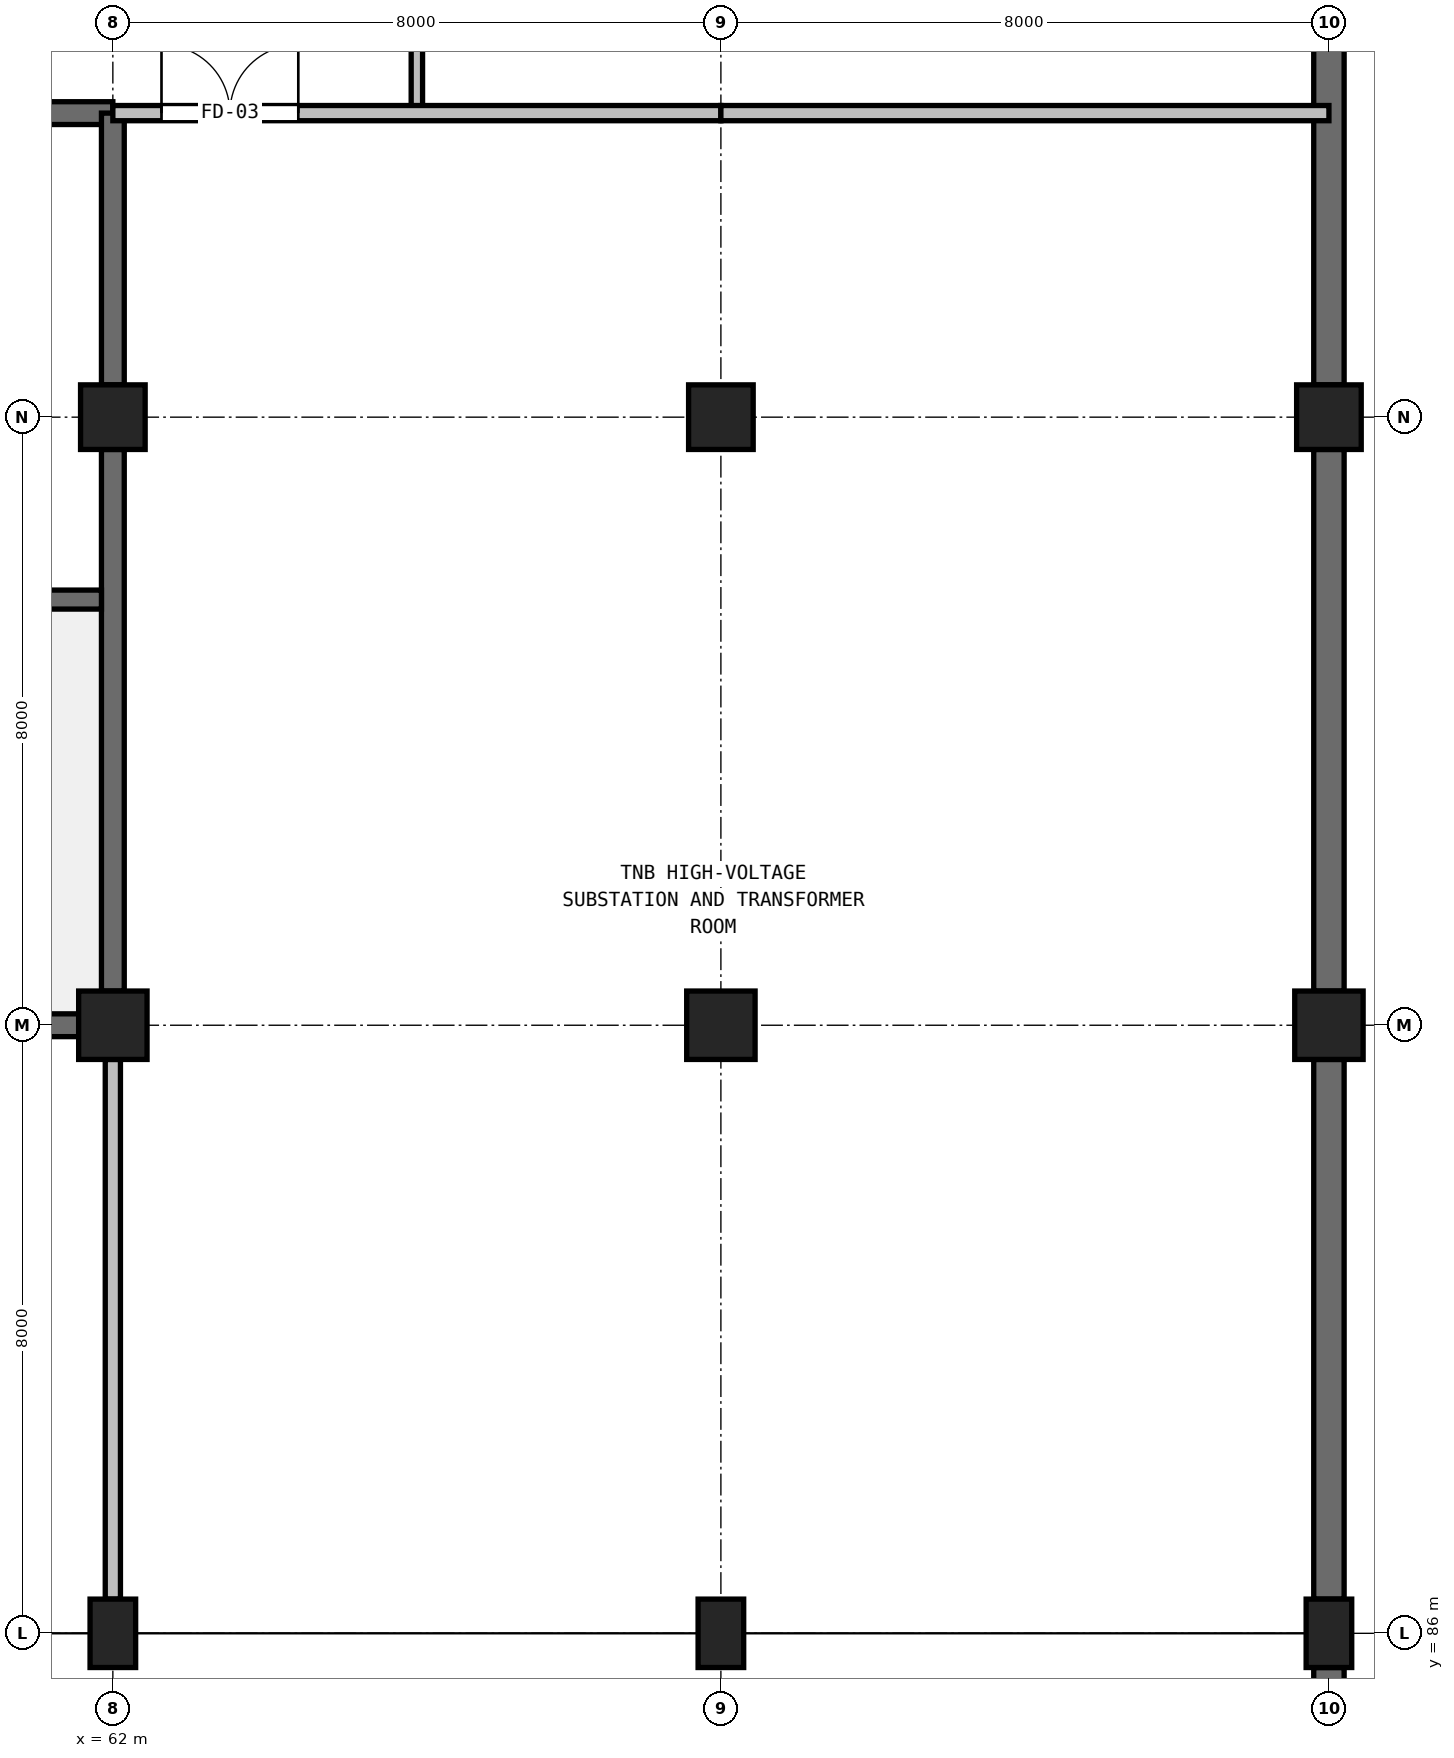
"""IFC4 building model, lengths in metres.
Left out: names, types, materials, properties, quantities, classifications, styles, units other than length and angle.
Written with IfcOpenShell. Run it as: python <this file> out.ifc"""

import sys

from ifc_helpers import new_model, si_unit, direction, frame, frame_2d, origin, origin_2d, place, context, subcontext, project, spatial, rectangle, extrude, element, fill, save


model = new_model("IFC4")
c1 = context("Model", 3, precision=1e-05, world=origin(), true_north=direction((0.0, 1.0)))
c2 = subcontext(c1, "Body", "Model", "MODEL_VIEW")
j1 = project(units=[si_unit("LENGTHUNIT", "METRE"), si_unit("PLANEANGLEUNIT", "RADIAN")], contexts=[c1])
p1 = place(None, origin())
s1 = spatial("IfcSite", under=j1, at=p1, CompositionType="ELEMENT")
p2 = place(p1, origin())
s2 = spatial("IfcBuilding", under=s1, at=p2, CompositionType="ELEMENT")
p3 = place(p2, frame((0.0, 0.0, -4.2)))
s3 = spatial("IfcBuildingStorey", under=s2, at=p3, CompositionType="ELEMENT", Elevation=-4.2)
p4 = place(p3, frame((62.0, 86.0, 0.0), z_axis=(0.0, 0.0, 1.0), x_axis=(1.0, 0.0, 0.0)))
e1 = element("IfcColumn", 1, at=p4, inside=s3, PredefinedType="COLUMN", context=c2, shape_type="SweptSolid", body=[
    extrude(rectangle(XDim=0.6, YDim=0.9, at=origin_2d()), origin(), (0.0, 0.0, 1.0), 4.2),
])
p5 = place(p3, frame((62.0, 94.0, 0.0), z_axis=(0.0, 0.0, 1.0), x_axis=(1.0, 0.0, 0.0)))
e2 = element("IfcColumn", 2, at=p5, inside=s3, PredefinedType="COLUMN", context=c2, shape_type="SweptSolid", body=[
    extrude(rectangle(XDim=0.9, YDim=0.9, at=origin_2d()), origin(), (0.0, 0.0, 1.0), 4.2),
])
p6 = place(p3, frame((62.0, 102.0, 0.0), z_axis=(0.0, 0.0, 1.0), x_axis=(1.0, 0.0, 0.0)))
e3 = element("IfcColumn", 3, at=p6, inside=s3, PredefinedType="COLUMN", context=c2, shape_type="SweptSolid", body=[
    extrude(rectangle(XDim=0.85, YDim=0.85, at=origin_2d()), origin(), (0.0, 0.0, 1.0), 4.2),
])
p7 = place(p3, frame((70.0, 86.0, 0.0), z_axis=(0.0, 0.0, 1.0), x_axis=(1.0, 0.0, 0.0)))
e4 = element("IfcColumn", 4, at=p7, inside=s3, PredefinedType="COLUMN", context=c2, shape_type="SweptSolid", body=[
    extrude(rectangle(XDim=0.6, YDim=0.9, at=origin_2d()), origin(), (0.0, 0.0, 1.0), 4.2),
])
p8 = place(p3, frame((70.0, 94.0, 0.0), z_axis=(0.0, 0.0, 1.0), x_axis=(1.0, 0.0, 0.0)))
e5 = element("IfcColumn", 5, at=p8, inside=s3, PredefinedType="COLUMN", context=c2, shape_type="SweptSolid", body=[
    extrude(rectangle(XDim=0.9, YDim=0.9, at=origin_2d()), origin(), (0.0, 0.0, 1.0), 4.2),
])
p9 = place(p3, frame((70.0, 102.0, 0.0), z_axis=(0.0, 0.0, 1.0), x_axis=(1.0, 0.0, 0.0)))
e6 = element("IfcColumn", 6, at=p9, inside=s3, PredefinedType="COLUMN", context=c2, shape_type="SweptSolid", body=[
    extrude(rectangle(XDim=0.85, YDim=0.85, at=origin_2d()), origin(), (0.0, 0.0, 1.0), 4.2),
])
p10 = place(p3, frame((78.0, 86.0, 0.0), z_axis=(0.0, 0.0, 1.0), x_axis=(1.0, 0.0, 0.0)))
e7 = element("IfcColumn", 7, at=p10, inside=s3, PredefinedType="COLUMN", context=c2, shape_type="SweptSolid", body=[
    extrude(rectangle(XDim=0.6, YDim=0.9, at=origin_2d()), origin(), (0.0, 0.0, 1.0), 4.2),
])
p11 = place(p3, frame((78.0, 94.0, 0.0), z_axis=(0.0, 0.0, 1.0), x_axis=(1.0, 0.0, 0.0)))
e8 = element("IfcColumn", 8, at=p11, inside=s3, PredefinedType="COLUMN", context=c2, shape_type="SweptSolid", body=[
    extrude(rectangle(XDim=0.9, YDim=0.9, at=origin_2d()), origin(), (0.0, 0.0, 1.0), 4.2),
])
p12 = place(p3, frame((78.0, 102.0, 0.0), z_axis=(0.0, 0.0, 1.0), x_axis=(1.0, 0.0, 0.0)))
e9 = element("IfcColumn", 9, at=p12, inside=s3, PredefinedType="COLUMN", context=c2, shape_type="SweptSolid", body=[
    extrude(rectangle(XDim=0.85, YDim=0.85, at=origin_2d()), origin(), (0.0, 0.0, 1.0), 4.2),
])
p13 = place(p3, frame((78.0, 78.0, 0.0), z_axis=(0.0, 0.0, 1.0), x_axis=(0.0, 1.0, 0.0)))
e10 = element("IfcWall", 10, at=p13, inside=s3, PredefinedType="USERDEFINED", context=c2, shape_type="SweptSolid", body=[
    extrude(rectangle(XDim=7.55, YDim=0.4, at=frame_2d((3.775, 0.0))), origin(), (0.0, 0.0, 1.0), 3.92),
])
p14 = place(p3, frame((78.0, 86.45, 0.0), z_axis=(0.0, 0.0, 1.0), x_axis=(0.0, 1.0, 0.0)))
e11 = element("IfcWall", 11, at=p14, inside=s3, PredefinedType="USERDEFINED", context=c2, shape_type="SweptSolid", body=[
    extrude(rectangle(XDim=7.1, YDim=0.4, at=frame_2d((3.55, 0.0))), origin(), (0.0, 0.0, 1.0), 3.92),
])
for number, where, z_axis, x_axis in (
    (12, (78.0, 94.45, 0.0), (0.0, 0.0, 1.0), (0.0, 1.0, 0.0)),
    (13, (78.0, 102.425, 0.0), (0.0, 0.0, 1.0), (0.0, 1.0, 0.0)),
):
    element("IfcWall", number, at=place(p3, frame(where, z_axis=z_axis, x_axis=x_axis)), inside=s3, PredefinedType="USERDEFINED", context=c2, shape_type="SweptSolid", body=[
        extrude(rectangle(XDim=7.125, YDim=0.4, at=frame_2d((3.562, 0.0))), origin(), (0.0, 0.0, 1.0), 3.92),
    ])
p15 = place(p3, frame((54.45, 94.0, 0.0), z_axis=(0.0, 0.0, 1.0), x_axis=(1.0, 0.0, 0.0)))
e14 = element("IfcWall", 14, at=p15, inside=s3, PredefinedType="SHEAR", context=c2, shape_type="SweptSolid", body=[
    extrude(rectangle(XDim=7.1, YDim=0.3, at=frame_2d((3.55, 0.0))), origin(), (0.0, 0.0, 1.0), 3.98),
])
p16 = place(p3, frame((54.0, 106.0, 0.0), z_axis=(0.0, 0.0, 1.0), x_axis=(1.0, 0.0, 0.0)))
e15 = element("IfcWall", 15, at=p16, inside=s3, PredefinedType="SHEAR", context=c2, shape_type="SweptSolid", body=[
    extrude(rectangle(XDim=8.0, YDim=0.3, at=frame_2d((4.0, 0.0))), origin(), (0.0, 0.0, 1.0), 3.98),
])
p17 = place(p3, frame((62.0, 94.45, 0.0), z_axis=(0.0, 0.0, 1.0), x_axis=(0.0, 1.0, 0.0)))
e16 = element("IfcWall", 16, at=p17, inside=s3, PredefinedType="SHEAR", context=c2, shape_type="SweptSolid", body=[
    extrude(rectangle(XDim=7.125, YDim=0.3, at=frame_2d((3.562, 0.0))), origin(), (0.0, 0.0, 1.0), 3.98),
])
p18 = place(p3, frame((62.0, 102.425, 0.0), z_axis=(0.0, 0.0, 1.0), x_axis=(0.0, 1.0, 0.0)))
e17 = element("IfcWall", 17, at=p18, inside=s3, PredefinedType="SHEAR", context=c2, shape_type="SweptSolid", body=[
    extrude(rectangle(XDim=3.575, YDim=0.3, at=frame_2d((1.788, 0.0))), origin(), (0.0, 0.0, 1.0), 3.98),
])
p19 = place(p3, frame((54.15, 99.6, 0.0), z_axis=(0.0, 0.0, 1.0), x_axis=(1.0, 0.0, 0.0)))
e18 = element("IfcWall", 18, at=p19, inside=s3, PredefinedType="SOLIDWALL", context=c2, shape_type="SweptSolid", body=[
    extrude(rectangle(XDim=7.7, YDim=0.25, at=frame_2d((3.85, 0.0))), origin(), (0.0, 0.0, 1.0), 3.98),
])
p20 = place(p19, frame((0.45, 0.0, 0.0)))
e19 = element("IfcOpeningElement", 19, at=p20, cuts=e18, PredefinedType="OPENING", context=c2, shape_type="SweptSolid", body=[
    extrude(rectangle(XDim=1.0, YDim=2.2, at=frame_2d((0.5, 1.1))), frame((0.0, 0.135, 0.0), z_axis=(0.0, -1.0, 0.0), x_axis=(1.0, 0.0, 0.0)), (0.0, 0.0, 1.0), 0.27),
])
p21 = place(p3, frame((66.0, 106.0, 0.0), z_axis=(0.0, 0.0, 1.0), x_axis=(0.0, 1.0, 0.0)))
e20 = element("IfcWall", 20, at=p21, inside=s3, PredefinedType="PARTITIONING", context=c2, shape_type="SweptSolid", body=[
    extrude(rectangle(XDim=4.0, YDim=0.15, at=frame_2d((2.0, 0.0))), origin(), (0.0, 0.0, 1.0), 3.9),
])
p22 = place(p3, frame((62.0, 86.45, 0.0), z_axis=(0.0, 0.0, 1.0), x_axis=(0.0, 1.0, 0.0)))
e21 = element("IfcWall", 21, at=p22, inside=s3, PredefinedType="PARTITIONING", context=c2, shape_type="SweptSolid", body=[
    extrude(rectangle(XDim=7.1, YDim=0.2, at=frame_2d((3.55, 0.0))), origin(), (0.0, 0.0, 1.0), 2.92),
])
p23 = place(p3, frame((62.0, 106.0, 0.0), z_axis=(0.0, 0.0, 1.0), x_axis=(1.0, 0.0, 0.0)))
e22 = element("IfcWall", 22, at=p23, inside=s3, PredefinedType="PARTITIONING", context=c2, shape_type="SweptSolid", body=[
    extrude(rectangle(XDim=8.0, YDim=0.2, at=frame_2d((4.0, 0.0))), origin(), (0.0, 0.0, 1.0), 3.9),
])
p24 = place(p23, frame((0.64, 0.0, 0.0)))
e23 = element("IfcOpeningElement", 23, at=p24, cuts=e22, PredefinedType="OPENING", context=c2, shape_type="SweptSolid", body=[
    extrude(rectangle(XDim=1.8, YDim=2.2, at=frame_2d((0.9, 1.1))), frame((0.0, 0.11, 0.0), z_axis=(0.0, -1.0, 0.0), x_axis=(1.0, 0.0, 0.0)), (0.0, 0.0, 1.0), 0.22),
])
p25 = place(p3, frame((70.0, 106.0, 0.0), z_axis=(0.0, 0.0, 1.0), x_axis=(1.0, 0.0, 0.0)))
e24 = element("IfcWall", 24, at=p25, inside=s3, PredefinedType="PARTITIONING", context=c2, shape_type="SweptSolid", body=[
    extrude(rectangle(XDim=8.0, YDim=0.2, at=frame_2d((4.0, 0.0))), origin(), (0.0, 0.0, 1.0), 3.9),
])
p26 = place(p24, origin())
e25 = element("IfcDoor", 25, at=p26, inside=s3, OperationType="DOUBLE_DOOR_SINGLE_SWING", PredefinedType="DOOR", context=c2, shape_type="SweptSolid", body=[
    extrude(rectangle(XDim=1.8, YDim=2.2, at=frame_2d((0.9, 1.1))), frame((0.0, 0.025, 0.0), z_axis=(0.0, -1.0, 0.0), x_axis=(1.0, 0.0, 0.0)), (0.0, 0.0, 1.0), 0.05),
])
fill(e23, e25)
save(model, sys.argv[1])
